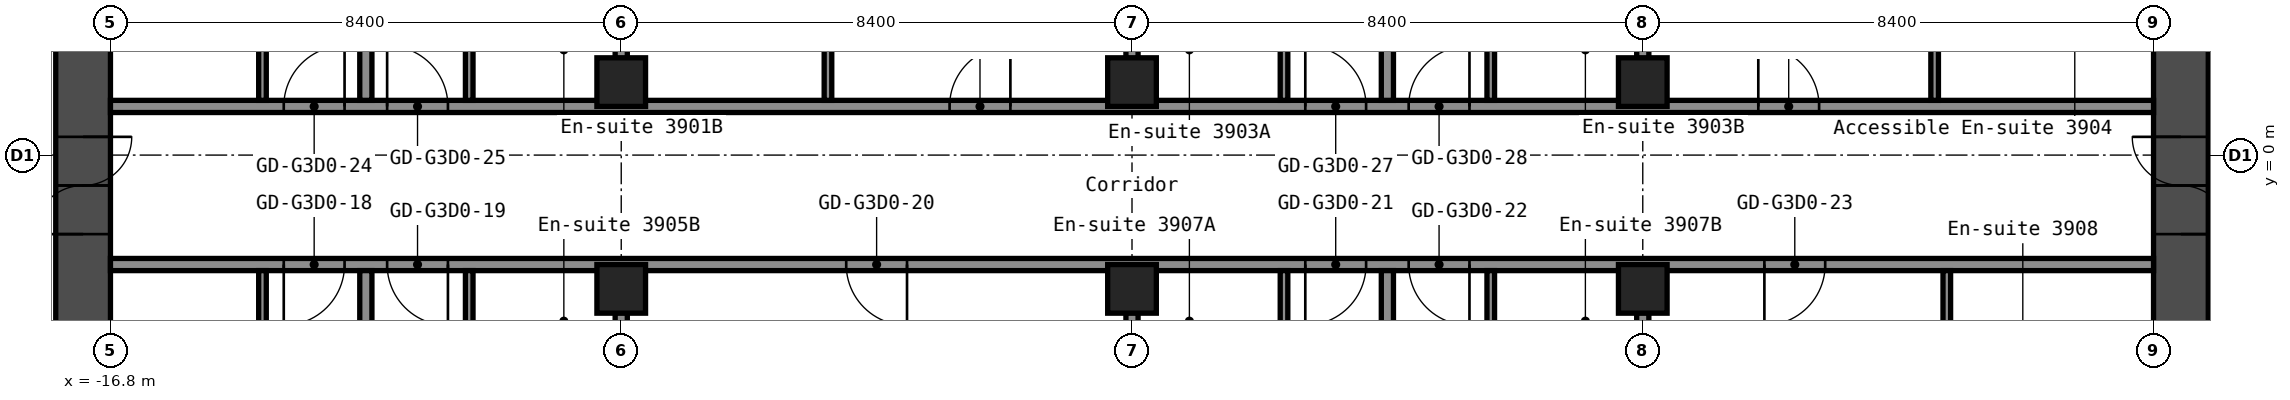
"""IFC4 building model, lengths in metres.
Left out: names, types, materials, properties, quantities, classifications, styles, units other than length and angle.
Written with IfcOpenShell. Run it as: python <this file> out.ifc"""

import sys

from ifc_helpers import new_model, si_unit, direction, frame, frame_2d, origin, origin_2d, place, context, subcontext, project, spatial, rectangle, hollow_rectangle, extrude, element, fill, save


model = new_model("IFC4")
c1 = context("Model", 3, precision=1e-05, world=origin(), true_north=direction((0.0, 1.0)))
c2 = subcontext(c1, "Body", "Model", "MODEL_VIEW")
j1 = project(units=[si_unit("LENGTHUNIT", "METRE"), si_unit("PLANEANGLEUNIT", "RADIAN")], contexts=[c1])
p1 = place(None, origin())
s1 = spatial("IfcSite", under=j1, at=p1, CompositionType="ELEMENT")
p2 = place(p1, origin())
s2 = spatial("IfcBuilding", under=s1, at=p2, CompositionType="ELEMENT")
p3 = place(p2, frame((0.0, 0.0, 140.6)))
s3 = spatial("IfcBuildingStorey", under=s2, at=p3, CompositionType="ELEMENT", Elevation=140.6)
for number, where, z_axis, x_axis in (
    (1, (-8.4, -2.2, 0.0), (0.0, 0.0, 1.0), (1.0, 0.0, 0.0)),
    (2, (-8.4, 1.2, 0.0), (0.0, 0.0, 1.0), (1.0, 0.0, 0.0)),
    (3, (0.0, -2.2, 0.0), (0.0, 0.0, 1.0), (1.0, 0.0, 0.0)),
    (4, (0.0, 1.2, 0.0), (0.0, 0.0, 1.0), (1.0, 0.0, 0.0)),
    (5, (8.4, -2.2, 0.0), (0.0, 0.0, 1.0), (1.0, 0.0, 0.0)),
    (6, (8.4, 1.2, 0.0), (0.0, 0.0, 1.0), (1.0, 0.0, 0.0)),
):
    element("IfcColumn", number, at=place(p3, frame(where, z_axis=z_axis, x_axis=x_axis)), inside=s3, PredefinedType="COLUMN", context=c2, shape_type="SweptSolid", body=[
        extrude(hollow_rectangle(XDim=0.8, YDim=0.8, WallThickness=0.032, at=origin_2d()), origin(), (0.0, 0.0, 1.0), 2.75),
    ])
p4 = place(p3, frame((-17.25, -8.4, 0.0), z_axis=(0.0, 0.0, 1.0), x_axis=(0.0, 1.0, 0.0)))
e7 = element("IfcWall", 7, at=p4, inside=s3, PredefinedType="SHEAR", context=c2, shape_type="SweptSolid", body=[
    extrude(rectangle(XDim=16.8, YDim=0.9, at=frame_2d((8.4, 0.0))), origin(), (0.0, 0.0, 1.0), 2.75),
])
p5 = place(p4, frame((7.1, 0.0, 0.0)))
e8 = element("IfcOpeningElement", 8, at=p5, cuts=e7, PredefinedType="OPENING", context=c2, shape_type="SweptSolid", body=[
    extrude(rectangle(XDim=1.6, YDim=2.1, at=frame_2d((0.8, 1.05))), frame((0.0, 0.46, 0.0), z_axis=(0.0, -1.0, 0.0), x_axis=(1.0, 0.0, 0.0)), (0.0, 0.0, 1.0), 0.92),
])
p6 = place(p3, frame((17.25, -8.4, 0.0), z_axis=(0.0, 0.0, 1.0), x_axis=(0.0, 1.0, 0.0)))
e9 = element("IfcWall", 9, at=p6, inside=s3, PredefinedType="SHEAR", context=c2, shape_type="SweptSolid", body=[
    extrude(rectangle(XDim=16.8, YDim=0.9, at=frame_2d((8.4, 0.0))), origin(), (0.0, 0.0, 1.0), 2.75),
])
p7 = place(p6, frame((7.1, 0.0, 0.0)))
e10 = element("IfcOpeningElement", 10, at=p7, cuts=e9, PredefinedType="OPENING", context=c2, shape_type="SweptSolid", body=[
    extrude(rectangle(XDim=1.6, YDim=2.1, at=frame_2d((0.8, 1.05))), frame((0.0, 0.46, 0.0), z_axis=(0.0, -1.0, 0.0), x_axis=(1.0, 0.0, 0.0)), (0.0, 0.0, 1.0), 0.92),
])
p8 = place(p3, frame((-16.8, -1.8, 0.0), z_axis=(0.0, 0.0, 1.0), x_axis=(1.0, 0.0, 0.0)))
e11 = element("IfcWall", 11, at=p8, inside=s3, PredefinedType="PARTITIONING", context=c2, shape_type="SweptSolid", body=[
    extrude(rectangle(XDim=33.6, YDim=0.2, at=frame_2d((16.8, 0.0))), origin(), (0.0, 0.0, 1.0), 2.75),
])
p9 = place(p8, frame((2.85, 0.0, 0.0)))
e12 = element("IfcOpeningElement", 12, at=p9, cuts=e11, PredefinedType="OPENING", context=c2, shape_type="SweptSolid", body=[
    extrude(rectangle(XDim=1.0, YDim=2.1, at=frame_2d((0.5, 1.05))), frame((0.0, 0.11, 0.0), z_axis=(0.0, -1.0, 0.0), x_axis=(1.0, 0.0, 0.0)), (0.0, 0.0, 1.0), 0.22),
])
p10 = place(p8, frame((4.55, 0.0, 0.0)))
e13 = element("IfcOpeningElement", 13, at=p10, cuts=e11, PredefinedType="OPENING", context=c2, shape_type="SweptSolid", body=[
    extrude(rectangle(XDim=1.0, YDim=2.1, at=frame_2d((0.5, 1.05))), frame((0.0, 0.11, 0.0), z_axis=(0.0, -1.0, 0.0), x_axis=(1.0, 0.0, 0.0)), (0.0, 0.0, 1.0), 0.22),
])
p11 = place(p8, frame((12.1, 0.0, 0.0)))
e14 = element("IfcOpeningElement", 14, at=p11, cuts=e11, PredefinedType="OPENING", context=c2, shape_type="SweptSolid", body=[
    extrude(rectangle(XDim=1.0, YDim=2.1, at=frame_2d((0.5, 1.05))), frame((0.0, 0.11, 0.0), z_axis=(0.0, -1.0, 0.0), x_axis=(1.0, 0.0, 0.0)), (0.0, 0.0, 1.0), 0.22),
])
p12 = place(p8, frame((19.65, 0.0, 0.0)))
e15 = element("IfcOpeningElement", 15, at=p12, cuts=e11, PredefinedType="OPENING", context=c2, shape_type="SweptSolid", body=[
    extrude(rectangle(XDim=1.0, YDim=2.1, at=frame_2d((0.5, 1.05))), frame((0.0, 0.11, 0.0), z_axis=(0.0, -1.0, 0.0), x_axis=(1.0, 0.0, 0.0)), (0.0, 0.0, 1.0), 0.22),
])
p13 = place(p8, frame((21.35, 0.0, 0.0)))
e16 = element("IfcOpeningElement", 16, at=p13, cuts=e11, PredefinedType="OPENING", context=c2, shape_type="SweptSolid", body=[
    extrude(rectangle(XDim=1.0, YDim=2.1, at=frame_2d((0.5, 1.05))), frame((0.0, 0.11, 0.0), z_axis=(0.0, -1.0, 0.0), x_axis=(1.0, 0.0, 0.0)), (0.0, 0.0, 1.0), 0.22),
])
p14 = place(p8, frame((27.2, 0.0, 0.0)))
e17 = element("IfcOpeningElement", 17, at=p14, cuts=e11, PredefinedType="OPENING", context=c2, shape_type="SweptSolid", body=[
    extrude(rectangle(XDim=1.0, YDim=2.1, at=frame_2d((0.5, 1.05))), frame((0.0, 0.11, 0.0), z_axis=(0.0, -1.0, 0.0), x_axis=(1.0, 0.0, 0.0)), (0.0, 0.0, 1.0), 0.22),
])
p15 = place(p3, frame((-16.8, 0.8, 0.0), z_axis=(0.0, 0.0, 1.0), x_axis=(1.0, 0.0, 0.0)))
e18 = element("IfcWall", 18, at=p15, inside=s3, PredefinedType="PARTITIONING", context=c2, shape_type="SweptSolid", body=[
    extrude(rectangle(XDim=33.6, YDim=0.2, at=frame_2d((16.8, 0.0))), origin(), (0.0, 0.0, 1.0), 2.75),
])
p16 = place(p15, frame((2.85, 0.0, 0.0)))
e19 = element("IfcOpeningElement", 19, at=p16, cuts=e18, PredefinedType="OPENING", context=c2, shape_type="SweptSolid", body=[
    extrude(rectangle(XDim=1.0, YDim=2.1, at=frame_2d((0.5, 1.05))), frame((0.0, 0.11, 0.0), z_axis=(0.0, -1.0, 0.0), x_axis=(1.0, 0.0, 0.0)), (0.0, 0.0, 1.0), 0.22),
])
p17 = place(p15, frame((4.55, 0.0, 0.0)))
e20 = element("IfcOpeningElement", 20, at=p17, cuts=e18, PredefinedType="OPENING", context=c2, shape_type="SweptSolid", body=[
    extrude(rectangle(XDim=1.0, YDim=2.1, at=frame_2d((0.5, 1.05))), frame((0.0, 0.11, 0.0), z_axis=(0.0, -1.0, 0.0), x_axis=(1.0, 0.0, 0.0)), (0.0, 0.0, 1.0), 0.22),
])
p18 = place(p15, frame((13.8, 0.0, 0.0)))
e21 = element("IfcOpeningElement", 21, at=p18, cuts=e18, PredefinedType="OPENING", context=c2, shape_type="SweptSolid", body=[
    extrude(rectangle(XDim=1.0, YDim=2.1, at=frame_2d((0.5, 1.05))), frame((0.0, 0.11, 0.0), z_axis=(0.0, -1.0, 0.0), x_axis=(1.0, 0.0, 0.0)), (0.0, 0.0, 1.0), 0.22),
])
p19 = place(p15, frame((19.65, 0.0, 0.0)))
e22 = element("IfcOpeningElement", 22, at=p19, cuts=e18, PredefinedType="OPENING", context=c2, shape_type="SweptSolid", body=[
    extrude(rectangle(XDim=1.0, YDim=2.1, at=frame_2d((0.5, 1.05))), frame((0.0, 0.11, 0.0), z_axis=(0.0, -1.0, 0.0), x_axis=(1.0, 0.0, 0.0)), (0.0, 0.0, 1.0), 0.22),
])
p20 = place(p15, frame((21.35, 0.0, 0.0)))
e23 = element("IfcOpeningElement", 23, at=p20, cuts=e18, PredefinedType="OPENING", context=c2, shape_type="SweptSolid", body=[
    extrude(rectangle(XDim=1.0, YDim=2.1, at=frame_2d((0.5, 1.05))), frame((0.0, 0.11, 0.0), z_axis=(0.0, -1.0, 0.0), x_axis=(1.0, 0.0, 0.0)), (0.0, 0.0, 1.0), 0.22),
])
p21 = place(p15, frame((27.1, 0.0, 0.0)))
e24 = element("IfcOpeningElement", 24, at=p21, cuts=e18, PredefinedType="OPENING", context=c2, shape_type="SweptSolid", body=[
    extrude(rectangle(XDim=1.0, YDim=2.1, at=frame_2d((0.5, 1.05))), frame((0.0, 0.11, 0.0), z_axis=(0.0, -1.0, 0.0), x_axis=(1.0, 0.0, 0.0)), (0.0, 0.0, 1.0), 0.22),
])
p22 = place(p3, frame((-14.3, -4.8, 0.0), z_axis=(0.0, 0.0, 1.0), x_axis=(0.0, 1.0, 0.0)))
e25 = element("IfcWall", 25, at=p22, inside=s3, PredefinedType="PARTITIONING", context=c2, shape_type="SweptSolid", body=[
    extrude(rectangle(XDim=2.9, YDim=0.125, at=frame_2d((1.45, 0.0))), origin(), (0.0, 0.0, 1.0), 2.75),
])
p23 = place(p22, frame((0.6, 0.0, 0.0)))
e26 = element("IfcOpeningElement", 26, at=p23, cuts=e25, PredefinedType="OPENING", context=c2, shape_type="SweptSolid", body=[
    extrude(rectangle(XDim=0.8, YDim=2.1, at=frame_2d((0.4, 1.05))), frame((0.0, 0.073, 0.0), z_axis=(0.0, -1.0, 0.0), x_axis=(1.0, 0.0, 0.0)), (0.0, 0.0, 1.0), 0.145),
])
p24 = place(p3, frame((-14.3, 0.9, 0.0), z_axis=(0.0, 0.0, 1.0), x_axis=(0.0, 1.0, 0.0)))
e27 = element("IfcWall", 27, at=p24, inside=s3, PredefinedType="PARTITIONING", context=c2, shape_type="SweptSolid", body=[
    extrude(rectangle(XDim=2.9, YDim=0.125, at=frame_2d((1.45, 0.0))), origin(), (0.0, 0.0, 1.0), 2.75),
])
p25 = place(p24, frame((1.5, 0.0, 0.0)))
e28 = element("IfcOpeningElement", 28, at=p25, cuts=e27, PredefinedType="OPENING", context=c2, shape_type="SweptSolid", body=[
    extrude(rectangle(XDim=0.8, YDim=2.1, at=frame_2d((0.4, 1.05))), frame((0.0, 0.073, 0.0), z_axis=(0.0, -1.0, 0.0), x_axis=(1.0, 0.0, 0.0)), (0.0, 0.0, 1.0), 0.145),
])
for number, where, z_axis, x_axis in (
    (29, (-12.6, -19.3, 0.0), (0.0, 0.0, 1.0), (0.0, 1.0, 0.0)),
    (30, (-12.6, 0.9, 0.0), (0.0, 0.0, 1.0), (0.0, 1.0, 0.0)),
):
    element("IfcWall", number, at=place(p3, frame(where, z_axis=z_axis, x_axis=x_axis)), inside=s3, PredefinedType="PARTITIONING", context=c2, shape_type="SweptSolid", body=[
        extrude(rectangle(XDim=17.4, YDim=0.2, at=frame_2d((8.7, 0.0))), origin(), (0.0, 0.0, 1.0), 2.75),
    ])
p26 = place(p3, frame((-10.9, -4.8, 0.0), z_axis=(0.0, 0.0, 1.0), x_axis=(0.0, 1.0, 0.0)))
e31 = element("IfcWall", 31, at=p26, inside=s3, PredefinedType="PARTITIONING", context=c2, shape_type="SweptSolid", body=[
    extrude(rectangle(XDim=2.9, YDim=0.125, at=frame_2d((1.45, 0.0))), origin(), (0.0, 0.0, 1.0), 2.75),
])
p27 = place(p26, frame((0.6, 0.0, 0.0)))
e32 = element("IfcOpeningElement", 32, at=p27, cuts=e31, PredefinedType="OPENING", context=c2, shape_type="SweptSolid", body=[
    extrude(rectangle(XDim=0.8, YDim=2.1, at=frame_2d((0.4, 1.05))), frame((0.0, 0.073, 0.0), z_axis=(0.0, -1.0, 0.0), x_axis=(1.0, 0.0, 0.0)), (0.0, 0.0, 1.0), 0.145),
])
p28 = place(p3, frame((-10.9, 0.9, 0.0), z_axis=(0.0, 0.0, 1.0), x_axis=(0.0, 1.0, 0.0)))
e33 = element("IfcWall", 33, at=p28, inside=s3, PredefinedType="PARTITIONING", context=c2, shape_type="SweptSolid", body=[
    extrude(rectangle(XDim=2.9, YDim=0.125, at=frame_2d((1.45, 0.0))), origin(), (0.0, 0.0, 1.0), 2.75),
])
p29 = place(p28, frame((1.5, 0.0, 0.0)))
e34 = element("IfcOpeningElement", 34, at=p29, cuts=e33, PredefinedType="OPENING", context=c2, shape_type="SweptSolid", body=[
    extrude(rectangle(XDim=0.8, YDim=2.1, at=frame_2d((0.4, 1.05))), frame((0.0, 0.073, 0.0), z_axis=(0.0, -1.0, 0.0), x_axis=(1.0, 0.0, 0.0)), (0.0, 0.0, 1.0), 0.145),
])
for number, where, z_axis, x_axis in (
    (35, (-8.4, -19.3, 0.0), (0.0, 0.0, 1.0), (0.0, 1.0, 0.0)),
    (36, (-8.4, 1.59, 0.0), (0.0, 0.0, 1.0), (0.0, 1.0, 0.0)),
):
    element("IfcWall", number, at=place(p3, frame(where, z_axis=z_axis, x_axis=x_axis)), inside=s3, PredefinedType="PARTITIONING", context=c2, shape_type="SweptSolid", body=[
        extrude(rectangle(XDim=16.71, YDim=0.2, at=frame_2d((8.355, 0.0))), origin(), (0.0, 0.0, 1.0), 2.75),
    ])
p30 = place(p3, frame((-5.0, 0.9, 0.0), z_axis=(0.0, 0.0, 1.0), x_axis=(0.0, 1.0, 0.0)))
e37 = element("IfcWall", 37, at=p30, inside=s3, PredefinedType="PARTITIONING", context=c2, shape_type="SweptSolid", body=[
    extrude(rectangle(XDim=3.3, YDim=0.125, at=frame_2d((1.65, 0.0))), origin(), (0.0, 0.0, 1.0), 2.75),
])
for number, where, z_axis, x_axis in (
    (38, (0.0, -19.3, 0.0), (0.0, 0.0, 1.0), (0.0, 1.0, 0.0)),
    (39, (0.0, 1.59, 0.0), (0.0, 0.0, 1.0), (0.0, 1.0, 0.0)),
):
    element("IfcWall", number, at=place(p3, frame(where, z_axis=z_axis, x_axis=x_axis)), inside=s3, PredefinedType="PARTITIONING", context=c2, shape_type="SweptSolid", body=[
        extrude(rectangle(XDim=16.71, YDim=0.2, at=frame_2d((8.355, 0.0))), origin(), (0.0, 0.0, 1.0), 2.75),
    ])
p31 = place(p3, frame((2.5, -4.8, 0.0), z_axis=(0.0, 0.0, 1.0), x_axis=(0.0, 1.0, 0.0)))
e40 = element("IfcWall", 40, at=p31, inside=s3, PredefinedType="PARTITIONING", context=c2, shape_type="SweptSolid", body=[
    extrude(rectangle(XDim=2.9, YDim=0.125, at=frame_2d((1.45, 0.0))), origin(), (0.0, 0.0, 1.0), 2.75),
])
p32 = place(p31, frame((0.6, 0.0, 0.0)))
e41 = element("IfcOpeningElement", 41, at=p32, cuts=e40, PredefinedType="OPENING", context=c2, shape_type="SweptSolid", body=[
    extrude(rectangle(XDim=0.8, YDim=2.1, at=frame_2d((0.4, 1.05))), frame((0.0, 0.073, 0.0), z_axis=(0.0, -1.0, 0.0), x_axis=(1.0, 0.0, 0.0)), (0.0, 0.0, 1.0), 0.145),
])
p33 = place(p3, frame((2.5, 0.9, 0.0), z_axis=(0.0, 0.0, 1.0), x_axis=(0.0, 1.0, 0.0)))
e42 = element("IfcWall", 42, at=p33, inside=s3, PredefinedType="PARTITIONING", context=c2, shape_type="SweptSolid", body=[
    extrude(rectangle(XDim=2.9, YDim=0.125, at=frame_2d((1.45, 0.0))), origin(), (0.0, 0.0, 1.0), 2.75),
])
p34 = place(p33, frame((1.5, 0.0, 0.0)))
e43 = element("IfcOpeningElement", 43, at=p34, cuts=e42, PredefinedType="OPENING", context=c2, shape_type="SweptSolid", body=[
    extrude(rectangle(XDim=0.8, YDim=2.1, at=frame_2d((0.4, 1.05))), frame((0.0, 0.073, 0.0), z_axis=(0.0, -1.0, 0.0), x_axis=(1.0, 0.0, 0.0)), (0.0, 0.0, 1.0), 0.145),
])
for number, where, z_axis, x_axis in (
    (44, (4.2, -19.3, 0.0), (0.0, 0.0, 1.0), (0.0, 1.0, 0.0)),
    (45, (4.2, 0.9, 0.0), (0.0, 0.0, 1.0), (0.0, 1.0, 0.0)),
):
    element("IfcWall", number, at=place(p3, frame(where, z_axis=z_axis, x_axis=x_axis)), inside=s3, PredefinedType="PARTITIONING", context=c2, shape_type="SweptSolid", body=[
        extrude(rectangle(XDim=17.4, YDim=0.2, at=frame_2d((8.7, 0.0))), origin(), (0.0, 0.0, 1.0), 2.75),
    ])
p35 = place(p3, frame((5.9, -4.8, 0.0), z_axis=(0.0, 0.0, 1.0), x_axis=(0.0, 1.0, 0.0)))
e46 = element("IfcWall", 46, at=p35, inside=s3, PredefinedType="PARTITIONING", context=c2, shape_type="SweptSolid", body=[
    extrude(rectangle(XDim=2.9, YDim=0.125, at=frame_2d((1.45, 0.0))), origin(), (0.0, 0.0, 1.0), 2.75),
])
p36 = place(p35, frame((0.6, 0.0, 0.0)))
e47 = element("IfcOpeningElement", 47, at=p36, cuts=e46, PredefinedType="OPENING", context=c2, shape_type="SweptSolid", body=[
    extrude(rectangle(XDim=0.8, YDim=2.1, at=frame_2d((0.4, 1.05))), frame((0.0, 0.073, 0.0), z_axis=(0.0, -1.0, 0.0), x_axis=(1.0, 0.0, 0.0)), (0.0, 0.0, 1.0), 0.145),
])
p37 = place(p3, frame((5.9, 0.9, 0.0), z_axis=(0.0, 0.0, 1.0), x_axis=(0.0, 1.0, 0.0)))
e48 = element("IfcWall", 48, at=p37, inside=s3, PredefinedType="PARTITIONING", context=c2, shape_type="SweptSolid", body=[
    extrude(rectangle(XDim=2.9, YDim=0.125, at=frame_2d((1.45, 0.0))), origin(), (0.0, 0.0, 1.0), 2.75),
])
p38 = place(p37, frame((1.5, 0.0, 0.0)))
e49 = element("IfcOpeningElement", 49, at=p38, cuts=e48, PredefinedType="OPENING", context=c2, shape_type="SweptSolid", body=[
    extrude(rectangle(XDim=0.8, YDim=2.1, at=frame_2d((0.4, 1.05))), frame((0.0, 0.073, 0.0), z_axis=(0.0, -1.0, 0.0), x_axis=(1.0, 0.0, 0.0)), (0.0, 0.0, 1.0), 0.145),
])
for number, where, z_axis, x_axis in (
    (50, (8.4, -19.3, 0.0), (0.0, 0.0, 1.0), (0.0, 1.0, 0.0)),
    (51, (8.4, 1.59, 0.0), (0.0, 0.0, 1.0), (0.0, 1.0, 0.0)),
):
    element("IfcWall", number, at=place(p3, frame(where, z_axis=z_axis, x_axis=x_axis)), inside=s3, PredefinedType="PARTITIONING", context=c2, shape_type="SweptSolid", body=[
        extrude(rectangle(XDim=16.71, YDim=0.2, at=frame_2d((8.355, 0.0))), origin(), (0.0, 0.0, 1.0), 2.75),
    ])
p39 = place(p3, frame((13.2, 0.9, 0.0), z_axis=(0.0, 0.0, 1.0), x_axis=(0.0, 1.0, 0.0)))
e52 = element("IfcWall", 52, at=p39, inside=s3, PredefinedType="PARTITIONING", context=c2, shape_type="SweptSolid", body=[
    extrude(rectangle(XDim=3.3, YDim=0.125, at=frame_2d((1.65, 0.0))), origin(), (0.0, 0.0, 1.0), 2.75),
])
p40 = place(p39, frame((1.1, 0.0, 0.0)))
e53 = element("IfcOpeningElement", 53, at=p40, cuts=e52, PredefinedType="OPENING", context=c2, shape_type="SweptSolid", body=[
    extrude(rectangle(XDim=1.0, YDim=2.1, at=frame_2d((0.5, 1.05))), frame((0.0, 0.073, 0.0), z_axis=(0.0, -1.0, 0.0), x_axis=(1.0, 0.0, 0.0)), (0.0, 0.0, 1.0), 0.145),
])
p41 = place(p3, frame((13.4, -5.2, 0.0), z_axis=(0.0, 0.0, 1.0), x_axis=(0.0, 1.0, 0.0)))
e54 = element("IfcWall", 54, at=p41, inside=s3, PredefinedType="PARTITIONING", context=c2, shape_type="SweptSolid", body=[
    extrude(rectangle(XDim=3.3, YDim=0.125, at=frame_2d((1.65, 0.0))), origin(), (0.0, 0.0, 1.0), 2.75),
])
p42 = place(p5, origin())
e55 = element("IfcDoor", 55, at=p42, inside=s3, OperationType="DOUBLE_DOOR_SINGLE_SWING", PredefinedType="DOOR", context=c2, shape_type="SweptSolid", body=[
    extrude(rectangle(XDim=1.6, YDim=2.1, at=frame_2d((0.8, 1.05))), frame((0.0, 0.025, 0.0), z_axis=(0.0, -1.0, 0.0), x_axis=(1.0, 0.0, 0.0)), (0.0, 0.0, 1.0), 0.05),
])
fill(e8, e55)
p43 = place(p7, origin())
e56 = element("IfcDoor", 56, at=p43, inside=s3, OperationType="DOUBLE_DOOR_SINGLE_SWING", PredefinedType="DOOR", context=c2, shape_type="SweptSolid", body=[
    extrude(rectangle(XDim=1.6, YDim=2.1, at=frame_2d((0.8, 1.05))), frame((0.0, 0.025, 0.0), z_axis=(0.0, -1.0, 0.0), x_axis=(1.0, 0.0, 0.0)), (0.0, 0.0, 1.0), 0.05),
])
fill(e10, e56)
p44 = place(p9, origin())
e57 = element("IfcDoor", 57, at=p44, inside=s3, OperationType="SINGLE_SWING_LEFT", PredefinedType="DOOR", context=c2, shape_type="SweptSolid", body=[
    extrude(rectangle(XDim=1.0, YDim=2.1, at=frame_2d((0.5, 1.05))), frame((0.0, 0.025, 0.0), z_axis=(0.0, -1.0, 0.0), x_axis=(1.0, 0.0, 0.0)), (0.0, 0.0, 1.0), 0.05),
])
fill(e12, e57)
p45 = place(p10, origin())
e58 = element("IfcDoor", 58, at=p45, inside=s3, OperationType="SINGLE_SWING_RIGHT", PredefinedType="DOOR", context=c2, shape_type="SweptSolid", body=[
    extrude(rectangle(XDim=1.0, YDim=2.1, at=frame_2d((0.5, 1.05))), frame((0.0, 0.025, 0.0), z_axis=(0.0, -1.0, 0.0), x_axis=(1.0, 0.0, 0.0)), (0.0, 0.0, 1.0), 0.05),
])
fill(e13, e58)
p46 = place(p11, origin())
e59 = element("IfcDoor", 59, at=p46, inside=s3, OperationType="SINGLE_SWING_RIGHT", PredefinedType="DOOR", context=c2, shape_type="SweptSolid", body=[
    extrude(rectangle(XDim=1.0, YDim=2.1, at=frame_2d((0.5, 1.05))), frame((0.0, 0.025, 0.0), z_axis=(0.0, -1.0, 0.0), x_axis=(1.0, 0.0, 0.0)), (0.0, 0.0, 1.0), 0.05),
])
fill(e14, e59)
p47 = place(p12, origin())
e60 = element("IfcDoor", 60, at=p47, inside=s3, OperationType="SINGLE_SWING_LEFT", PredefinedType="DOOR", context=c2, shape_type="SweptSolid", body=[
    extrude(rectangle(XDim=1.0, YDim=2.1, at=frame_2d((0.5, 1.05))), frame((0.0, 0.025, 0.0), z_axis=(0.0, -1.0, 0.0), x_axis=(1.0, 0.0, 0.0)), (0.0, 0.0, 1.0), 0.05),
])
fill(e15, e60)
p48 = place(p13, origin())
e61 = element("IfcDoor", 61, at=p48, inside=s3, OperationType="SINGLE_SWING_RIGHT", PredefinedType="DOOR", context=c2, shape_type="SweptSolid", body=[
    extrude(rectangle(XDim=1.0, YDim=2.1, at=frame_2d((0.5, 1.05))), frame((0.0, 0.025, 0.0), z_axis=(0.0, -1.0, 0.0), x_axis=(1.0, 0.0, 0.0)), (0.0, 0.0, 1.0), 0.05),
])
fill(e16, e61)
p49 = place(p14, origin())
e62 = element("IfcDoor", 62, at=p49, inside=s3, OperationType="SINGLE_SWING_LEFT", PredefinedType="DOOR", context=c2, shape_type="SweptSolid", body=[
    extrude(rectangle(XDim=1.0, YDim=2.1, at=frame_2d((0.5, 1.05))), frame((0.0, 0.025, 0.0), z_axis=(0.0, -1.0, 0.0), x_axis=(1.0, 0.0, 0.0)), (0.0, 0.0, 1.0), 0.05),
])
fill(e17, e62)
p50 = place(p16, origin())
e63 = element("IfcDoor", 63, at=p50, inside=s3, OperationType="SINGLE_SWING_LEFT", PredefinedType="DOOR", context=c2, shape_type="SweptSolid", body=[
    extrude(rectangle(XDim=1.0, YDim=2.1, at=frame_2d((0.5, 1.05))), frame((0.0, 0.025, 0.0), z_axis=(0.0, -1.0, 0.0), x_axis=(1.0, 0.0, 0.0)), (0.0, 0.0, 1.0), 0.05),
])
fill(e19, e63)
p51 = place(p17, origin())
e64 = element("IfcDoor", 64, at=p51, inside=s3, OperationType="SINGLE_SWING_RIGHT", PredefinedType="DOOR", context=c2, shape_type="SweptSolid", body=[
    extrude(rectangle(XDim=1.0, YDim=2.1, at=frame_2d((0.5, 1.05))), frame((0.0, 0.025, 0.0), z_axis=(0.0, -1.0, 0.0), x_axis=(1.0, 0.0, 0.0)), (0.0, 0.0, 1.0), 0.05),
])
fill(e20, e64)
p52 = place(p18, origin())
e65 = element("IfcDoor", 65, at=p52, inside=s3, OperationType="SINGLE_SWING_LEFT", PredefinedType="DOOR", context=c2, shape_type="SweptSolid", body=[
    extrude(rectangle(XDim=1.0, YDim=2.1, at=frame_2d((0.5, 1.05))), frame((0.0, 0.025, 0.0), z_axis=(0.0, -1.0, 0.0), x_axis=(1.0, 0.0, 0.0)), (0.0, 0.0, 1.0), 0.05),
])
fill(e21, e65)
p53 = place(p19, origin())
e66 = element("IfcDoor", 66, at=p53, inside=s3, OperationType="SINGLE_SWING_RIGHT", PredefinedType="DOOR", context=c2, shape_type="SweptSolid", body=[
    extrude(rectangle(XDim=1.0, YDim=2.1, at=frame_2d((0.5, 1.05))), frame((0.0, 0.025, 0.0), z_axis=(0.0, -1.0, 0.0), x_axis=(1.0, 0.0, 0.0)), (0.0, 0.0, 1.0), 0.05),
])
fill(e22, e66)
p54 = place(p20, origin())
e67 = element("IfcDoor", 67, at=p54, inside=s3, OperationType="SINGLE_SWING_LEFT", PredefinedType="DOOR", context=c2, shape_type="SweptSolid", body=[
    extrude(rectangle(XDim=1.0, YDim=2.1, at=frame_2d((0.5, 1.05))), frame((0.0, 0.025, 0.0), z_axis=(0.0, -1.0, 0.0), x_axis=(1.0, 0.0, 0.0)), (0.0, 0.0, 1.0), 0.05),
])
fill(e23, e67)
p55 = place(p21, origin())
e68 = element("IfcDoor", 68, at=p55, inside=s3, OperationType="SINGLE_SWING_RIGHT", PredefinedType="DOOR", context=c2, shape_type="SweptSolid", body=[
    extrude(rectangle(XDim=1.0, YDim=2.1, at=frame_2d((0.5, 1.05))), frame((0.0, 0.025, 0.0), z_axis=(0.0, -1.0, 0.0), x_axis=(1.0, 0.0, 0.0)), (0.0, 0.0, 1.0), 0.05),
])
fill(e24, e68)
save(model, sys.argv[1])
